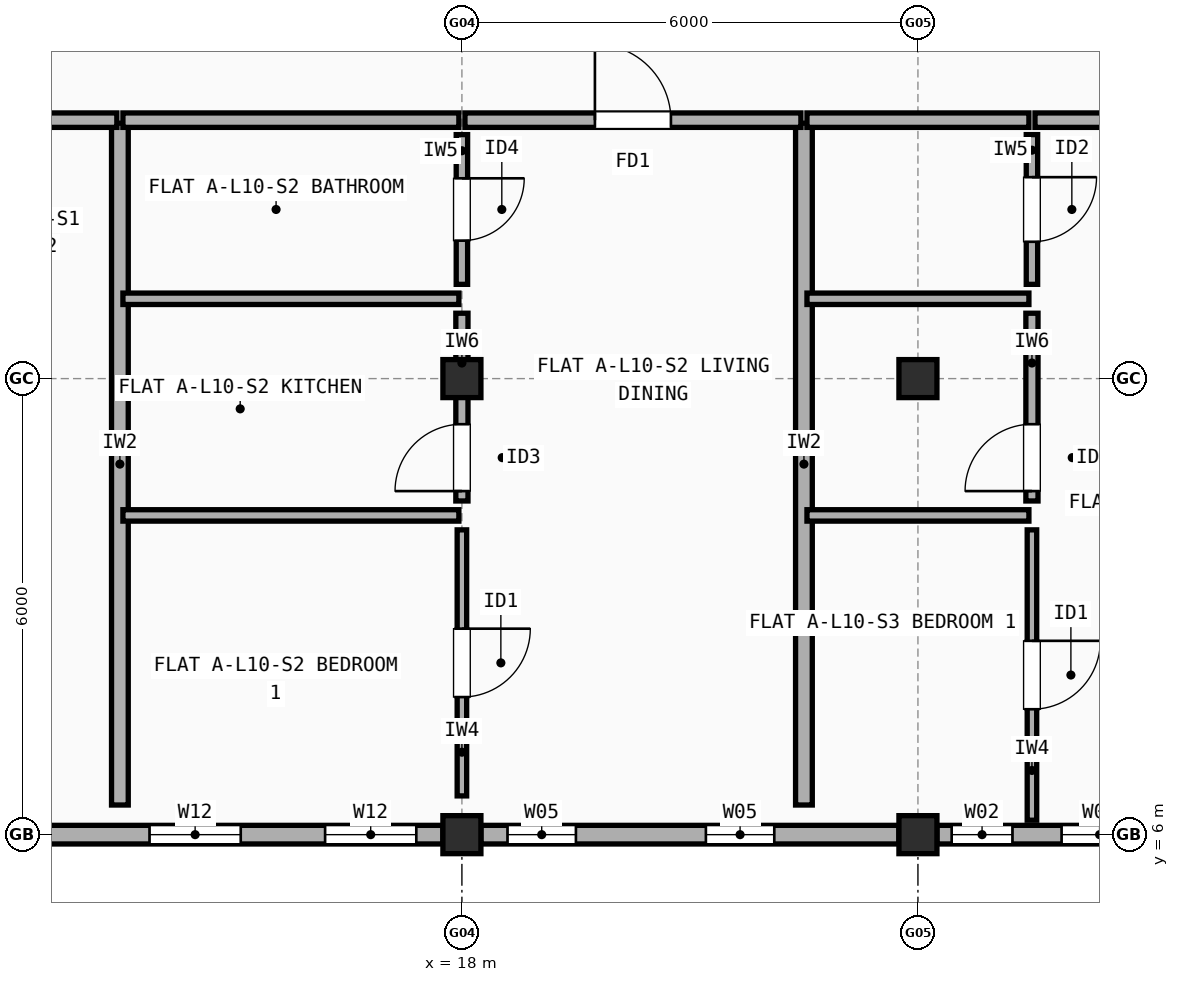
"""IFC4 building model, lengths in metres.
Left out: names, types, materials, properties, quantities, classifications, styles, units other than length and angle.
Written with IfcOpenShell. Run it as: python <this file> out.ifc"""

import sys

from ifc_helpers import new_model, si_unit, direction, frame, frame_2d, origin, origin_2d, place, context, subcontext, project, spatial, rectangle, extrude, element, fill, save


model = new_model("IFC4")
c1 = context("Model", 3, precision=1e-05, world=origin(), true_north=direction((0.0, 1.0)))
c2 = subcontext(c1, "Body", "Model", "MODEL_VIEW")
j1 = project(units=[si_unit("LENGTHUNIT", "METRE"), si_unit("PLANEANGLEUNIT", "RADIAN")], contexts=[c1])
p1 = place(None, origin())
s1 = spatial("IfcSite", under=j1, at=p1, CompositionType="ELEMENT")
p2 = place(p1, origin())
s2 = spatial("IfcBuilding", under=s1, at=p2, CompositionType="ELEMENT")
p3 = place(p2, frame((0.0, 0.0, 33.3)))
s3 = spatial("IfcBuildingStorey", under=s2, at=p3, CompositionType="ELEMENT", Elevation=33.3)
for number, where, z_axis, x_axis in (
    (1, (18.0, 6.0, 0.0), (0.0, 0.0, 1.0), (1.0, 0.0, 0.0)),
    (2, (18.0, 12.0, 0.0), (0.0, 0.0, 1.0), (1.0, 0.0, 0.0)),
    (3, (24.0, 6.0, 0.0), (0.0, 0.0, 1.0), (1.0, 0.0, 0.0)),
    (4, (24.0, 12.0, 0.0), (0.0, 0.0, 1.0), (1.0, 0.0, 0.0)),
):
    element("IfcColumn", number, at=place(p3, frame(where, z_axis=z_axis, x_axis=x_axis)), inside=s3, PredefinedType="COLUMN", context=c2, shape_type="SweptSolid", body=[
        extrude(rectangle(XDim=0.5, YDim=0.5, at=origin_2d()), origin(), (0.0, 0.0, 1.0), 2.99),
    ])
p4 = place(p3, frame((12.25, 6.0, 0.0), z_axis=(0.0, 0.0, 1.0), x_axis=(1.0, 0.0, 0.0)))
e5 = element("IfcWall", 5, at=p4, inside=s3, PredefinedType="STANDARD", context=c2, shape_type="SweptSolid", body=[
    extrude(rectangle(XDim=5.5, YDim=0.245, at=frame_2d((2.75, 0.0))), origin(), (0.0, 0.0, 1.0), 2.472),
])
p5 = place(p4, frame((1.64, 0.0, 0.9)))
e6 = element("IfcOpeningElement", 6, at=p5, cuts=e5, PredefinedType="OPENING", context=c2, shape_type="SweptSolid", body=[
    extrude(rectangle(XDim=1.2, YDim=1.35, at=frame_2d((0.6, 0.675))), frame((0.0, 0.133, 0.0), z_axis=(0.0, -1.0, 0.0), x_axis=(1.0, 0.0, 0.0)), (0.0, 0.0, 1.0), 0.265),
])
p6 = place(p4, frame((3.95, 0.0, 0.9)))
e7 = element("IfcOpeningElement", 7, at=p6, cuts=e5, PredefinedType="OPENING", context=c2, shape_type="SweptSolid", body=[
    extrude(rectangle(XDim=1.2, YDim=1.35, at=frame_2d((0.6, 0.675))), frame((0.0, 0.133, 0.0), z_axis=(0.0, -1.0, 0.0), x_axis=(1.0, 0.0, 0.0)), (0.0, 0.0, 1.0), 0.265),
])
p7 = place(p3, frame((18.25, 6.0, 0.0), z_axis=(0.0, 0.0, 1.0), x_axis=(1.0, 0.0, 0.0)))
e8 = element("IfcWall", 8, at=p7, inside=s3, PredefinedType="STANDARD", context=c2, shape_type="SweptSolid", body=[
    extrude(rectangle(XDim=5.5, YDim=0.245, at=frame_2d((2.75, 0.0))), origin(), (0.0, 0.0, 1.0), 2.472),
])
p8 = place(p7, frame((0.35, 0.0, 0.9)))
e9 = element("IfcOpeningElement", 9, at=p8, cuts=e8, PredefinedType="OPENING", context=c2, shape_type="SweptSolid", body=[
    extrude(rectangle(XDim=0.9, YDim=1.4, at=frame_2d((0.45, 0.7))), frame((0.0, 0.133, 0.0), z_axis=(0.0, -1.0, 0.0), x_axis=(1.0, 0.0, 0.0)), (0.0, 0.0, 1.0), 0.265),
])
p9 = place(p7, frame((2.96, 0.0, 0.9)))
e10 = element("IfcOpeningElement", 10, at=p9, cuts=e8, PredefinedType="OPENING", context=c2, shape_type="SweptSolid", body=[
    extrude(rectangle(XDim=0.9, YDim=1.4, at=frame_2d((0.45, 0.7))), frame((0.0, 0.133, 0.0), z_axis=(0.0, -1.0, 0.0), x_axis=(1.0, 0.0, 0.0)), (0.0, 0.0, 1.0), 0.265),
])
p10 = place(p3, frame((24.25, 6.0, 0.0), z_axis=(0.0, 0.0, 1.0), x_axis=(1.0, 0.0, 0.0)))
e11 = element("IfcWall", 11, at=p10, inside=s3, PredefinedType="STANDARD", context=c2, shape_type="SweptSolid", body=[
    extrude(rectangle(XDim=5.525, YDim=0.245, at=frame_2d((2.762, 0.0))), origin(), (0.0, 0.0, 1.0), 2.472),
])
p11 = place(p10, frame((1.64, 0.0, 0.9)))
e12 = element("IfcOpeningElement", 12, at=p11, cuts=e11, PredefinedType="OPENING", context=c2, shape_type="SweptSolid", body=[
    extrude(rectangle(XDim=1.0, YDim=1.4, at=frame_2d((0.5, 0.7))), frame((0.0, 0.133, 0.0), z_axis=(0.0, -1.0, 0.0), x_axis=(1.0, 0.0, 0.0)), (0.0, 0.0, 1.0), 0.265),
])
p12 = place(p10, frame((4.175, 0.0, 0.9)))
e13 = element("IfcOpeningElement", 13, at=p12, cuts=e11, PredefinedType="OPENING", context=c2, shape_type="SweptSolid", body=[
    extrude(rectangle(XDim=1.0, YDim=1.4, at=frame_2d((0.5, 0.7))), frame((0.0, 0.133, 0.0), z_axis=(0.0, -1.0, 0.0), x_axis=(1.0, 0.0, 0.0)), (0.0, 0.0, 1.0), 0.265),
])
p13 = place(p10, frame((0.194, 0.0, 0.9)))
e14 = element("IfcOpeningElement", 14, at=p13, cuts=e11, PredefinedType="OPENING", context=c2, shape_type="SweptSolid", body=[
    extrude(rectangle(XDim=0.8, YDim=1.2, at=frame_2d((0.4, 0.6))), frame((0.0, 0.133, 0.0), z_axis=(0.0, -1.0, 0.0), x_axis=(1.0, 0.0, 0.0)), (0.0, 0.0, 1.0), 0.265),
])
p14 = place(p3, frame((13.5, 6.39, 0.0), z_axis=(0.0, 0.0, 1.0), x_axis=(0.0, 1.0, 0.0)))
e15 = element("IfcWall", 15, at=p14, inside=s3, PredefinedType="SOLIDWALL", context=c2, shape_type="SweptSolid", body=[
    extrude(rectangle(XDim=8.97, YDim=0.22, at=frame_2d((4.485, 0.0))), origin(), (0.0, 0.0, 1.0), 2.408),
])
p15 = place(p3, frame((10.54, 15.4, 0.0), z_axis=(0.0, 0.0, 1.0), x_axis=(1.0, 0.0, 0.0)))
e16 = element("IfcWall", 16, at=p15, inside=s3, PredefinedType="SOLIDWALL", context=c2, shape_type="SweptSolid", body=[
    extrude(rectangle(XDim=2.92, YDim=0.19, at=frame_2d((1.46, 0.0))), origin(), (0.0, 0.0, 1.0), 2.548),
])
p16 = place(p3, frame((22.5, 6.39, 0.0), z_axis=(0.0, 0.0, 1.0), x_axis=(0.0, 1.0, 0.0)))
e17 = element("IfcWall", 17, at=p16, inside=s3, PredefinedType="SOLIDWALL", context=c2, shape_type="SweptSolid", body=[
    extrude(rectangle(XDim=8.97, YDim=0.22, at=frame_2d((4.485, 0.0))), origin(), (0.0, 0.0, 1.0), 2.548),
])
p17 = place(p3, frame((13.54, 15.4, 0.0), z_axis=(0.0, 0.0, 1.0), x_axis=(1.0, 0.0, 0.0)))
e18 = element("IfcWall", 18, at=p17, inside=s3, PredefinedType="SOLIDWALL", context=c2, shape_type="SweptSolid", body=[
    extrude(rectangle(XDim=4.42, YDim=0.19, at=frame_2d((2.21, 0.0))), origin(), (0.0, 0.0, 1.0), 2.508),
])
p18 = place(p3, frame((18.04, 15.4, 0.0), z_axis=(0.0, 0.0, 1.0), x_axis=(1.0, 0.0, 0.0)))
e19 = element("IfcWall", 19, at=p18, inside=s3, PredefinedType="SOLIDWALL", context=c2, shape_type="SweptSolid", body=[
    extrude(rectangle(XDim=4.42, YDim=0.19, at=frame_2d((2.21, 0.0))), origin(), (0.0, 0.0, 1.0), 2.508),
])
p19 = place(p18, frame((1.71, 0.0, 0.0)))
e20 = element("IfcOpeningElement", 20, at=p19, cuts=e19, PredefinedType="OPENING", context=c2, shape_type="SweptSolid", body=[
    extrude(rectangle(XDim=1.0, YDim=2.15, at=frame_2d((0.5, 1.075))), frame((0.0, 0.105, 0.0), z_axis=(0.0, -1.0, 0.0), x_axis=(1.0, 0.0, 0.0)), (0.0, 0.0, 1.0), 0.21),
])
p20 = place(p3, frame((18.0, 6.51, 0.0), z_axis=(0.0, 0.0, 1.0), x_axis=(0.0, 1.0, 0.0)))
e21 = element("IfcWall", 21, at=p20, inside=s3, PredefinedType="PARTITIONING", context=c2, shape_type="SweptSolid", body=[
    extrude(rectangle(XDim=3.5, YDim=0.125, at=frame_2d((1.75, 0.0))), origin(), (0.0, 0.0, 1.0), 2.548),
])
p21 = place(p20, frame((1.3, 0.0, 0.0)))
e22 = element("IfcOpeningElement", 22, at=p21, cuts=e21, PredefinedType="OPENING", context=c2, shape_type="SweptSolid", body=[
    extrude(rectangle(XDim=0.9, YDim=2.1, at=frame_2d((0.45, 1.05))), frame((0.0, 0.073, 0.0), z_axis=(0.0, -1.0, 0.0), x_axis=(1.0, 0.0, 0.0)), (0.0, 0.0, 1.0), 0.145),
])
p22 = place(p3, frame((18.0, 10.39, 0.0), z_axis=(0.0, 0.0, 1.0), x_axis=(0.0, 1.0, 0.0)))
e23 = element("IfcWall", 23, at=p22, inside=s3, PredefinedType="PLUMBINGWALL", context=c2, shape_type="SweptSolid", body=[
    extrude(rectangle(XDim=2.47, YDim=0.16, at=frame_2d((1.235, 0.0))), origin(), (0.0, 0.0, 1.0), 2.508),
])
p23 = place(p22, frame((0.13, 0.0, 0.0)))
e24 = element("IfcOpeningElement", 24, at=p23, cuts=e23, PredefinedType="OPENING", context=c2, shape_type="SweptSolid", body=[
    extrude(rectangle(XDim=0.88, YDim=2.1, at=frame_2d((0.44, 1.05))), frame((0.0, 0.09, 0.0), z_axis=(0.0, -1.0, 0.0), x_axis=(1.0, 0.0, 0.0)), (0.0, 0.0, 1.0), 0.18),
])
p24 = place(p3, frame((18.0, 13.24, 0.0), z_axis=(0.0, 0.0, 1.0), x_axis=(0.0, 1.0, 0.0)))
e25 = element("IfcWall", 25, at=p24, inside=s3, PredefinedType="PARTITIONING", context=c2, shape_type="SweptSolid", body=[
    extrude(rectangle(XDim=1.97, YDim=0.15, at=frame_2d((0.985, 0.0))), origin(), (0.0, 0.0, 1.0), 2.508),
])
p25 = place(p24, frame((0.575, 0.0, 0.0)))
e26 = element("IfcOpeningElement", 26, at=p25, cuts=e25, PredefinedType="OPENING", context=c2, shape_type="SweptSolid", body=[
    extrude(rectangle(XDim=0.82, YDim=2.08, at=frame_2d((0.41, 1.04))), frame((0.0, 0.085, 0.0), z_axis=(0.0, -1.0, 0.0), x_axis=(1.0, 0.0, 0.0)), (0.0, 0.0, 1.0), 0.17),
])
p26 = place(p3, frame((13.54, 10.2, 0.0), z_axis=(0.0, 0.0, 1.0), x_axis=(1.0, 0.0, 0.0)))
e27 = element("IfcWall", 27, at=p26, inside=s3, PredefinedType="PARTITIONING", context=c2, shape_type="SweptSolid", body=[
    extrude(rectangle(XDim=4.42, YDim=0.15, at=frame_2d((2.21, 0.0))), origin(), (0.0, 0.0, 1.0), 2.548),
])
p27 = place(p3, frame((13.54, 13.05, 0.0), z_axis=(0.0, 0.0, 1.0), x_axis=(1.0, 0.0, 0.0)))
e28 = element("IfcWall", 28, at=p27, inside=s3, PredefinedType="PARTITIONING", context=c2, shape_type="SweptSolid", body=[
    extrude(rectangle(XDim=4.42, YDim=0.15, at=frame_2d((2.21, 0.0))), origin(), (0.0, 0.0, 1.0), 2.508),
])
p28 = place(p3, frame((22.54, 15.4, 0.0), z_axis=(0.0, 0.0, 1.0), x_axis=(1.0, 0.0, 0.0)))
e29 = element("IfcWall", 29, at=p28, inside=s3, PredefinedType="SOLIDWALL", context=c2, shape_type="SweptSolid", body=[
    extrude(rectangle(XDim=2.92, YDim=0.19, at=frame_2d((1.46, 0.0))), origin(), (0.0, 0.0, 1.0), 2.508),
])
p29 = place(p3, frame((25.54, 15.4, 0.0), z_axis=(0.0, 0.0, 1.0), x_axis=(1.0, 0.0, 0.0)))
e30 = element("IfcWall", 30, at=p29, inside=s3, PredefinedType="SOLIDWALL", context=c2, shape_type="SweptSolid", body=[
    extrude(rectangle(XDim=4.42, YDim=0.19, at=frame_2d((2.21, 0.0))), origin(), (0.0, 0.0, 1.0), 2.472),
])
p30 = place(p29, frame((1.72, 0.0, 0.0)))
e31 = element("IfcOpeningElement", 31, at=p30, cuts=e30, PredefinedType="OPENING", context=c2, shape_type="SweptSolid", body=[
    extrude(rectangle(XDim=0.98, YDim=2.15, at=frame_2d((0.49, 1.075))), frame((0.0, 0.105, 0.0), z_axis=(0.0, -1.0, 0.0), x_axis=(1.0, 0.0, 0.0)), (0.0, 0.0, 1.0), 0.21),
])
p31 = place(p3, frame((25.5, 6.19, 0.0), z_axis=(0.0, 0.0, 1.0), x_axis=(0.0, 1.0, 0.0)))
e32 = element("IfcWall", 32, at=p31, inside=s3, PredefinedType="PARTITIONING", context=c2, shape_type="SweptSolid", body=[
    extrude(rectangle(XDim=3.82, YDim=0.125, at=frame_2d((1.91, 0.0))), origin(), (0.0, 0.0, 1.0), 2.99),
])
p32 = place(p31, frame((1.46, 0.0, 0.0)))
e33 = element("IfcOpeningElement", 33, at=p32, cuts=e32, PredefinedType="OPENING", context=c2, shape_type="SweptSolid", body=[
    extrude(rectangle(XDim=0.9, YDim=2.1, at=frame_2d((0.45, 1.05))), frame((0.0, 0.073, 0.0), z_axis=(0.0, -1.0, 0.0), x_axis=(1.0, 0.0, 0.0)), (0.0, 0.0, 1.0), 0.145),
])
p33 = place(p3, frame((25.5, 10.39, 0.0), z_axis=(0.0, 0.0, 1.0), x_axis=(0.0, 1.0, 0.0)))
e34 = element("IfcWall", 34, at=p33, inside=s3, PredefinedType="PLUMBINGWALL", context=c2, shape_type="SweptSolid", body=[
    extrude(rectangle(XDim=2.47, YDim=0.16, at=frame_2d((1.235, 0.0))), origin(), (0.0, 0.0, 1.0), 2.508),
])
p34 = place(p33, frame((0.13, 0.0, 0.0)))
e35 = element("IfcOpeningElement", 35, at=p34, cuts=e34, PredefinedType="OPENING", context=c2, shape_type="SweptSolid", body=[
    extrude(rectangle(XDim=0.88, YDim=2.1, at=frame_2d((0.44, 1.05))), frame((0.0, 0.09, 0.0), z_axis=(0.0, -1.0, 0.0), x_axis=(1.0, 0.0, 0.0)), (0.0, 0.0, 1.0), 0.18),
])
p35 = place(p3, frame((25.5, 13.24, 0.0), z_axis=(0.0, 0.0, 1.0), x_axis=(0.0, 1.0, 0.0)))
e36 = element("IfcWall", 36, at=p35, inside=s3, PredefinedType="PARTITIONING", context=c2, shape_type="SweptSolid", body=[
    extrude(rectangle(XDim=1.97, YDim=0.15, at=frame_2d((0.985, 0.0))), origin(), (0.0, 0.0, 1.0), 2.99),
])
p36 = place(p35, frame((0.56, 0.0, 0.0)))
e37 = element("IfcOpeningElement", 37, at=p36, cuts=e36, PredefinedType="OPENING", context=c2, shape_type="SweptSolid", body=[
    extrude(rectangle(XDim=0.85, YDim=2.1, at=frame_2d((0.425, 1.05))), frame((0.0, 0.085, 0.0), z_axis=(0.0, -1.0, 0.0), x_axis=(1.0, 0.0, 0.0)), (0.0, 0.0, 1.0), 0.17),
])
p37 = place(p3, frame((22.54, 10.2, 0.0), z_axis=(0.0, 0.0, 1.0), x_axis=(1.0, 0.0, 0.0)))
e38 = element("IfcWall", 38, at=p37, inside=s3, PredefinedType="PARTITIONING", context=c2, shape_type="SweptSolid", body=[
    extrude(rectangle(XDim=2.92, YDim=0.15, at=frame_2d((1.46, 0.0))), origin(), (0.0, 0.0, 1.0), 2.548),
])
p38 = place(p3, frame((22.54, 13.05, 0.0), z_axis=(0.0, 0.0, 1.0), x_axis=(1.0, 0.0, 0.0)))
e39 = element("IfcWall", 39, at=p38, inside=s3, PredefinedType="PARTITIONING", context=c2, shape_type="SweptSolid", body=[
    extrude(rectangle(XDim=2.92, YDim=0.15, at=frame_2d((1.46, 0.0))), origin(), (0.0, 0.0, 1.0), 2.508),
])
p39 = place(p5, origin())
e40 = element("IfcWindow", 40, at=p39, inside=s3, PartitioningType="SINGLE_PANEL", PredefinedType="WINDOW", context=c2, shape_type="SweptSolid", body=[
    extrude(rectangle(XDim=1.2, YDim=1.35, at=frame_2d((0.6, 0.675))), frame((0.0, 0.03, 0.0), z_axis=(0.0, -1.0, 0.0), x_axis=(1.0, 0.0, 0.0)), (0.0, 0.0, 1.0), 0.06),
])
fill(e6, e40)
p40 = place(p6, origin())
e41 = element("IfcWindow", 41, at=p40, inside=s3, PartitioningType="SINGLE_PANEL", PredefinedType="WINDOW", context=c2, shape_type="SweptSolid", body=[
    extrude(rectangle(XDim=1.2, YDim=1.35, at=frame_2d((0.6, 0.675))), frame((0.0, 0.03, 0.0), z_axis=(0.0, -1.0, 0.0), x_axis=(1.0, 0.0, 0.0)), (0.0, 0.0, 1.0), 0.06),
])
fill(e7, e41)
p41 = place(p8, origin())
e42 = element("IfcWindow", 42, at=p41, inside=s3, PartitioningType="SINGLE_PANEL", PredefinedType="WINDOW", context=c2, shape_type="SweptSolid", body=[
    extrude(rectangle(XDim=0.9, YDim=1.4, at=frame_2d((0.45, 0.7))), frame((0.0, 0.03, 0.0), z_axis=(0.0, -1.0, 0.0), x_axis=(1.0, 0.0, 0.0)), (0.0, 0.0, 1.0), 0.06),
])
fill(e9, e42)
p42 = place(p9, origin())
e43 = element("IfcWindow", 43, at=p42, inside=s3, PartitioningType="SINGLE_PANEL", PredefinedType="WINDOW", context=c2, shape_type="SweptSolid", body=[
    extrude(rectangle(XDim=0.9, YDim=1.4, at=frame_2d((0.45, 0.7))), frame((0.0, 0.03, 0.0), z_axis=(0.0, -1.0, 0.0), x_axis=(1.0, 0.0, 0.0)), (0.0, 0.0, 1.0), 0.06),
])
fill(e10, e43)
p43 = place(p11, origin())
e44 = element("IfcWindow", 44, at=p43, inside=s3, PartitioningType="SINGLE_PANEL", PredefinedType="WINDOW", context=c2, shape_type="SweptSolid", body=[
    extrude(rectangle(XDim=1.0, YDim=1.4, at=frame_2d((0.5, 0.7))), frame((0.0, 0.03, 0.0), z_axis=(0.0, -1.0, 0.0), x_axis=(1.0, 0.0, 0.0)), (0.0, 0.0, 1.0), 0.06),
])
fill(e12, e44)
p44 = place(p13, origin())
e45 = element("IfcWindow", 45, at=p44, inside=s3, PartitioningType="SINGLE_PANEL", PredefinedType="WINDOW", context=c2, shape_type="SweptSolid", body=[
    extrude(rectangle(XDim=0.8, YDim=1.2, at=frame_2d((0.4, 0.6))), frame((0.0, 0.03, 0.0), z_axis=(0.0, -1.0, 0.0), x_axis=(1.0, 0.0, 0.0)), (0.0, 0.0, 1.0), 0.06),
])
fill(e14, e45)
p45 = place(p19, origin())
e46 = element("IfcDoor", 46, at=p45, inside=s3, OperationType="SINGLE_SWING_LEFT", PredefinedType="DOOR", context=c2, shape_type="SweptSolid", body=[
    extrude(rectangle(XDim=1.0, YDim=2.15, at=frame_2d((0.5, 1.075))), frame((0.0, 0.025, 0.0), z_axis=(0.0, -1.0, 0.0), x_axis=(1.0, 0.0, 0.0)), (0.0, 0.0, 1.0), 0.05),
])
fill(e20, e46)
p46 = place(p21, origin())
e47 = element("IfcDoor", 47, at=p46, inside=s3, OperationType="SINGLE_SWING_RIGHT", PredefinedType="DOOR", context=c2, shape_type="SweptSolid", body=[
    extrude(rectangle(XDim=0.9, YDim=2.1, at=frame_2d((0.45, 1.05))), frame((0.0, 0.025, 0.0), z_axis=(0.0, -1.0, 0.0), x_axis=(1.0, 0.0, 0.0)), (0.0, 0.0, 1.0), 0.05),
])
fill(e22, e47)
p47 = place(p23, origin())
e48 = element("IfcDoor", 48, at=p47, inside=s3, OperationType="SINGLE_SWING_LEFT", PredefinedType="DOOR", context=c2, shape_type="SweptSolid", body=[
    extrude(rectangle(XDim=0.88, YDim=2.1, at=frame_2d((0.44, 1.05))), frame((0.0, 0.025, 0.0), z_axis=(0.0, -1.0, 0.0), x_axis=(1.0, 0.0, 0.0)), (0.0, 0.0, 1.0), 0.05),
])
fill(e24, e48)
p48 = place(p25, origin())
e49 = element("IfcDoor", 49, at=p48, inside=s3, OperationType="SINGLE_SWING_RIGHT", PredefinedType="DOOR", context=c2, shape_type="SweptSolid", body=[
    extrude(rectangle(XDim=0.82, YDim=2.08, at=frame_2d((0.41, 1.04))), frame((0.0, 0.025, 0.0), z_axis=(0.0, -1.0, 0.0), x_axis=(1.0, 0.0, 0.0)), (0.0, 0.0, 1.0), 0.05),
])
fill(e26, e49)
p49 = place(p32, origin())
e50 = element("IfcDoor", 50, at=p49, inside=s3, OperationType="SINGLE_SWING_RIGHT", PredefinedType="DOOR", context=c2, shape_type="SweptSolid", body=[
    extrude(rectangle(XDim=0.9, YDim=2.1, at=frame_2d((0.45, 1.05))), frame((0.0, 0.025, 0.0), z_axis=(0.0, -1.0, 0.0), x_axis=(1.0, 0.0, 0.0)), (0.0, 0.0, 1.0), 0.05),
])
fill(e33, e50)
p50 = place(p34, origin())
e51 = element("IfcDoor", 51, at=p50, inside=s3, OperationType="SINGLE_SWING_LEFT", PredefinedType="DOOR", context=c2, shape_type="SweptSolid", body=[
    extrude(rectangle(XDim=0.88, YDim=2.1, at=frame_2d((0.44, 1.05))), frame((0.0, 0.025, 0.0), z_axis=(0.0, -1.0, 0.0), x_axis=(1.0, 0.0, 0.0)), (0.0, 0.0, 1.0), 0.05),
])
fill(e35, e51)
p51 = place(p36, origin())
e52 = element("IfcDoor", 52, at=p51, inside=s3, OperationType="SINGLE_SWING_RIGHT", PredefinedType="DOOR", context=c2, shape_type="SweptSolid", body=[
    extrude(rectangle(XDim=0.85, YDim=2.1, at=frame_2d((0.425, 1.05))), frame((0.0, 0.025, 0.0), z_axis=(0.0, -1.0, 0.0), x_axis=(1.0, 0.0, 0.0)), (0.0, 0.0, 1.0), 0.05),
])
fill(e37, e52)
save(model, sys.argv[1])
